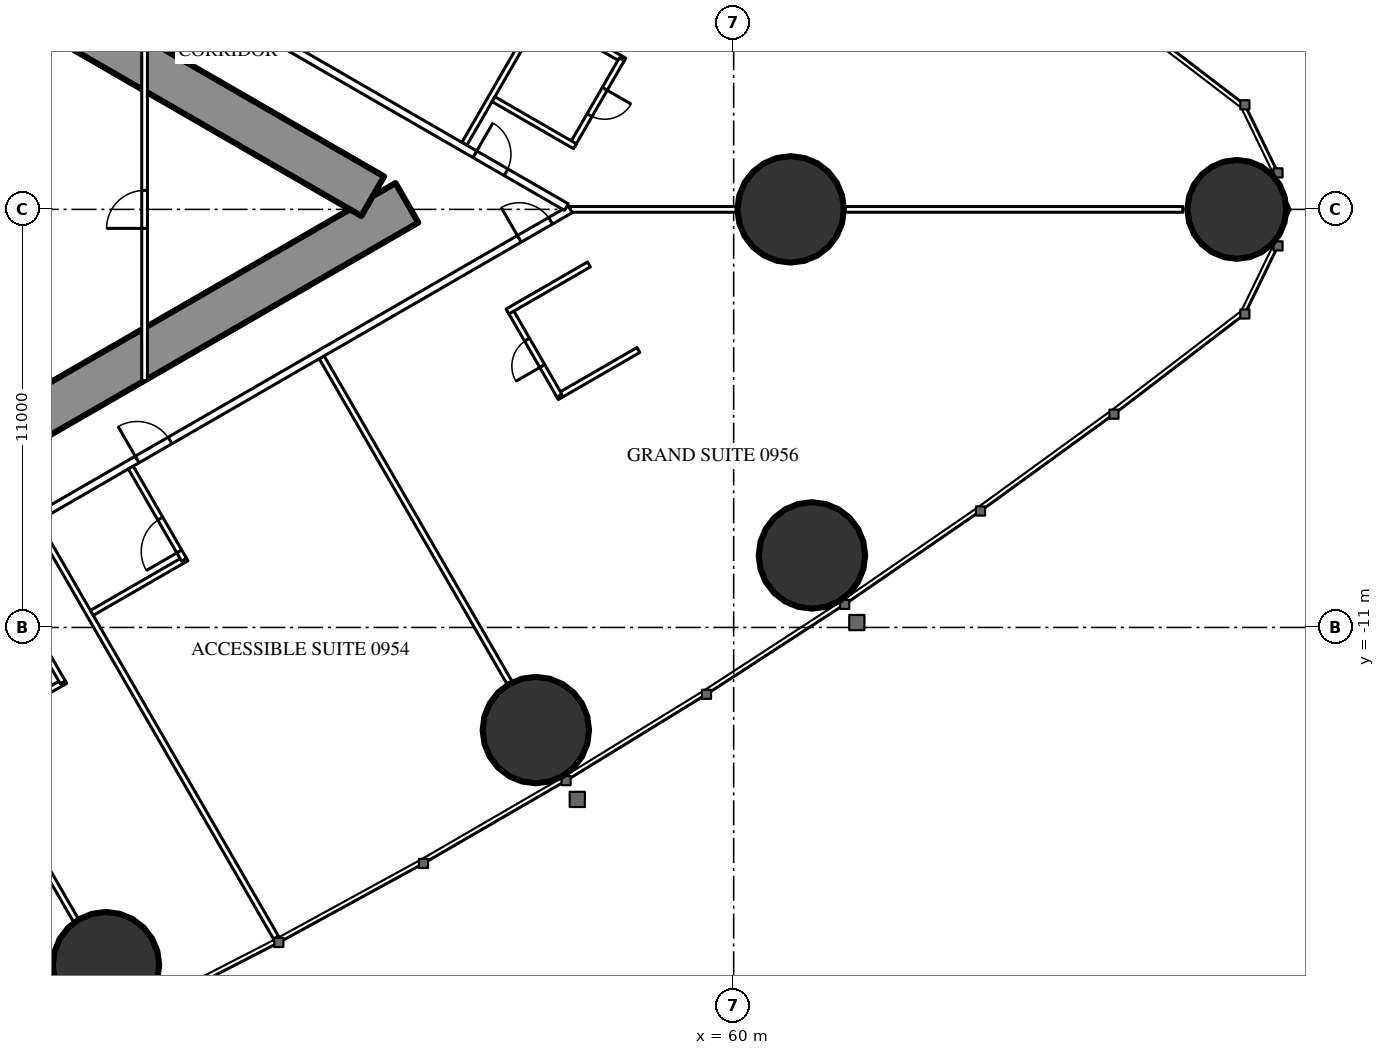
"""IFC4 building model, lengths in metres.
Left out: names, types, materials, properties, quantities, classifications, styles, units other than length and angle.
Written with IfcOpenShell. Run it as: python <this file> out.ifc"""

import sys

from ifc_helpers import new_model, si_unit, direction, frame, frame_2d, origin, origin_2d, place, context, subcontext, project, spatial, rectangle, hollow_circle, extrude, element, fill, save


model = new_model("IFC4")
c1 = context("Model", 3, precision=1e-05, world=origin(), true_north=direction((0.0, 1.0)))
c2 = subcontext(c1, "Body", "Model", "MODEL_VIEW")
j1 = project(units=[si_unit("LENGTHUNIT", "METRE"), si_unit("PLANEANGLEUNIT", "RADIAN")], contexts=[c1])
p1 = place(None, origin())
s1 = spatial("IfcSite", under=j1, at=p1, CompositionType="ELEMENT")
p2 = place(p1, origin())
s2 = spatial("IfcBuilding", under=s1, at=p2, CompositionType="ELEMENT")
p3 = place(p2, frame((0.0, 0.0, 39.0)))
s3 = spatial("IfcBuildingStorey", under=s2, at=p3, CompositionType="ELEMENT", Elevation=39.0)
p4 = place(p3, frame((73.239, 0.0, 0.0), z_axis=(0.0, 0.0, 1.0), x_axis=(1.0, 0.0, 0.0)))
e1 = element("IfcColumn", 1, at=p4, inside=s3, PredefinedType="COLUMN", context=c2, shape_type="SweptSolid", body=[
    extrude(hollow_circle(Radius=1.3, WallThickness=0.1, at=origin_2d()), origin(), (0.0, 0.0, 1.0), 3.5),
])
for number, where, z_axis, x_axis in (
    (2, (43.484, -19.886, 0.0), (0.0, 0.0, 1.0), (1.0, 0.0, 0.0)),
    (3, (54.795, -13.701, 0.0), (0.0, 0.0, 1.0), (1.0, 0.0, 0.0)),
    (4, (62.059, -9.105, 0.0), (0.0, 0.0, 1.0), (1.0, 0.0, 0.0)),
):
    element("IfcColumn", number, at=place(p3, frame(where, z_axis=z_axis, x_axis=x_axis)), inside=s3, PredefinedType="COLUMN", context=c2, shape_type="SweptSolid", body=[
        extrude(hollow_circle(Radius=1.4, WallThickness=0.12, at=origin_2d()), origin(), (0.0, 0.0, 1.0), 3.5),
    ])
p5 = place(p3, frame((61.5, 0.0, 0.0), z_axis=(0.0, 0.0, 1.0), x_axis=(1.0, 0.0, 0.0)))
e5 = element("IfcColumn", 5, at=p5, inside=s3, PredefinedType="COLUMN", context=c2, shape_type="SweptSolid", body=[
    extrude(hollow_circle(Radius=1.4, WallThickness=0.1, at=origin_2d()), origin(), (0.0, 0.0, 1.0), 3.5),
])
p6 = place(p3, frame((27.2, -13.8, 0.0), z_axis=(0.0, 0.0, 1.0), x_axis=(0.866027159892, 0.499996958321, 0.0)))
e6 = element("IfcWall", 6, at=p6, inside=s3, PredefinedType="SHEAR", context=c2, shape_type="SweptSolid", body=[
    extrude(rectangle(XDim=27.947, YDim=1.2, at=frame_2d((13.973, 0.0))), origin(), (0.0, 0.0, 1.0), 3.5),
])
p7 = place(p6, frame((4.6, 0.0, 0.0)))
e7 = element("IfcOpeningElement", 7, at=p7, cuts=e6, PredefinedType="OPENING", context=c2, shape_type="SweptSolid", body=[
    extrude(rectangle(XDim=1.0, YDim=2.2, at=frame_2d((0.5, 1.1))), frame((0.0, 0.61, 0.0), z_axis=(0.0, -1.0, 0.0), x_axis=(1.0, 0.0, 0.0)), (0.0, 0.0, 1.0), 1.22),
])
p8 = place(p6, frame((13.395, 0.0, 0.0)))
e8 = element("IfcOpeningElement", 8, at=p8, cuts=e6, PredefinedType="OPENING", context=c2, shape_type="SweptSolid", body=[
    extrude(rectangle(XDim=1.8, YDim=2.2, at=frame_2d((0.9, 1.1))), frame((0.0, 0.61, 0.0), z_axis=(0.0, -1.0, 0.0), x_axis=(1.0, 0.0, 0.0)), (0.0, 0.0, 1.0), 1.22),
])
p9 = place(p3, frame((27.2, 13.8, 0.0), z_axis=(0.0, 0.0, 1.0), x_axis=(0.866024515034, -0.500001539357, 0.0)))
e9 = element("IfcWall", 9, at=p9, inside=s3, PredefinedType="SHEAR", context=c2, shape_type="SweptSolid", body=[
    extrude(rectangle(XDim=26.907, YDim=1.2, at=frame_2d((13.454, 0.0))), origin(), (0.0, 0.0, 1.0), 3.5),
])
p10 = place(p9, frame((4.6, 0.0, 0.0)))
e10 = element("IfcOpeningElement", 10, at=p10, cuts=e9, PredefinedType="OPENING", context=c2, shape_type="SweptSolid", body=[
    extrude(rectangle(XDim=1.0, YDim=2.2, at=frame_2d((0.5, 1.1))), frame((0.0, 0.61, 0.0), z_axis=(0.0, -1.0, 0.0), x_axis=(1.0, 0.0, 0.0)), (0.0, 0.0, 1.0), 1.22),
])
p11 = place(p9, frame((13.395, 0.0, 0.0)))
e11 = element("IfcOpeningElement", 11, at=p11, cuts=e9, PredefinedType="OPENING", context=c2, shape_type="SweptSolid", body=[
    extrude(rectangle(XDim=1.8, YDim=2.2, at=frame_2d((0.9, 1.1))), frame((0.0, 0.61, 0.0), z_axis=(0.0, -1.0, 0.0), x_axis=(1.0, 0.0, 0.0)), (0.0, 0.0, 1.0), 1.22),
])
p12 = place(p3, frame((41.647, -8.23, 0.0), z_axis=(0.0, 0.0, 1.0), x_axis=(0.49998590462, -0.866033541603, 0.0)))
e12 = element("IfcWall", 12, at=p12, inside=s3, PredefinedType="PARTITIONING", context=c2, shape_type="SweptSolid", body=[
    extrude(rectangle(XDim=12.621, YDim=0.15, at=frame_2d((6.311, 0.0))), origin(), (0.0, 0.0, 1.0), 3.25),
])
p13 = place(p3, frame((49.159, -3.893, 0.0), z_axis=(0.0, 0.0, 1.0), x_axis=(0.499998773722, -0.866026111775, 0.0)))
e13 = element("IfcWall", 13, at=p13, inside=s3, PredefinedType="PARTITIONING", context=c2, shape_type="SweptSolid", body=[
    extrude(rectangle(XDim=9.892, YDim=0.15, at=frame_2d((4.946, 0.0))), origin(), (0.0, 0.0, 1.0), 2.25),
])
p14 = place(p3, frame((52.915, 1.725, 0.0), z_axis=(0.0, 0.0, 1.0), x_axis=(0.499997163113, 0.866027041656, 0.0)))
e14 = element("IfcWall", 14, at=p14, inside=s3, PredefinedType="PARTITIONING", context=c2, shape_type="SweptSolid", body=[
    extrude(rectangle(XDim=12.591, YDim=0.15, at=frame_2d((6.295, 0.0))), origin(), (0.0, 0.0, 1.0), 3.25),
])
p15 = place(p3, frame((55.702, 0.0, 0.0), z_axis=(0.0, 0.0, 1.0), x_axis=(1.0, 0.0, 0.0)))
e15 = element("IfcWall", 15, at=p15, inside=s3, PredefinedType="PARTITIONING", context=c2, shape_type="SweptSolid", body=[
    extrude(rectangle(XDim=16.117, YDim=0.15, at=frame_2d((8.059, 0.0))), origin(), (0.0, 0.0, 1.0), 2.25),
])
p16 = place(p3, frame((40.57, -15.03, 0.0), z_axis=(0.0, 0.0, 1.0), x_axis=(0.500012993597, -0.866017901798, 0.0)))
e16 = element("IfcWall", 16, at=p16, inside=s3, PredefinedType="PARTITIONING", context=c2, shape_type="SweptSolid", body=[
    extrude(rectangle(XDim=4.243, YDim=0.15, at=frame_2d((2.122, 0.0))), origin(), (0.0, 0.0, 1.0), 3.25),
])
p17 = place(p3, frame((37.96, -10.243, 0.0), z_axis=(0.0, 0.0, 1.0), x_axis=(0.866026429433, 0.499998223521, 0.0)))
e17 = element("IfcWall", 17, at=p17, inside=s3, PredefinedType="PARTITIONING", context=c2, shape_type="SweptSolid", body=[
    extrude(rectangle(XDim=20.487, YDim=0.2, at=frame_2d((10.243, 0.0))), origin(), (0.0, 0.0, 1.0), 3.25),
])
p18 = place(p17, frame((7.325, 0.0, 0.0)))
e18 = element("IfcOpeningElement", 18, at=p18, cuts=e17, PredefinedType="OPENING", context=c2, shape_type="SweptSolid", body=[
    extrude(rectangle(XDim=1.0, YDim=2.2, at=frame_2d((0.5, 1.1))), frame((0.0, 0.11, 0.0), z_axis=(0.0, -1.0, 0.0), x_axis=(1.0, 0.0, 0.0)), (0.0, 0.0, 1.0), 0.22),
])
p19 = place(p17, frame((18.937, 0.0, 0.0)))
e19 = element("IfcOpeningElement", 19, at=p19, cuts=e17, PredefinedType="OPENING", context=c2, shape_type="SweptSolid", body=[
    extrude(rectangle(XDim=0.95, YDim=2.2, at=frame_2d((0.475, 1.1))), frame((0.0, 0.11, 0.0), z_axis=(0.0, -1.0, 0.0), x_axis=(1.0, 0.0, 0.0)), (0.0, 0.0, 1.0), 0.22),
])
p20 = place(p17, frame((0.6, 0.0, 0.0)))
e20 = element("IfcOpeningElement", 20, at=p20, cuts=e17, PredefinedType="OPENING", context=c2, shape_type="SweptSolid", body=[
    extrude(rectangle(XDim=0.95, YDim=2.2, at=frame_2d((0.475, 1.1))), frame((0.0, 0.11, 0.0), z_axis=(0.0, -1.0, 0.0), x_axis=(1.0, 0.0, 0.0)), (0.0, 0.0, 1.0), 0.22),
])
p21 = place(p3, frame((36.834, 10.894, 0.0), z_axis=(0.0, 0.0, 1.0), x_axis=(0.866028157229, -0.499995230863, 0.0)))
e21 = element("IfcWall", 21, at=p21, inside=s3, PredefinedType="PARTITIONING", context=c2, shape_type="SweptSolid", body=[
    extrude(rectangle(XDim=21.667, YDim=0.2, at=frame_2d((10.833, 0.0))), origin(), (0.0, 0.0, 1.0), 3.25),
])
p22 = place(p21, frame((18.885, 0.0, 0.0)))
e22 = element("IfcOpeningElement", 22, at=p22, cuts=e21, PredefinedType="OPENING", context=c2, shape_type="SweptSolid", body=[
    extrude(rectangle(XDim=0.95, YDim=2.2, at=frame_2d((0.475, 1.1))), frame((0.0, 0.11, 0.0), z_axis=(0.0, -1.0, 0.0), x_axis=(1.0, 0.0, 0.0)), (0.0, 0.0, 1.0), 0.22),
])
p23 = place(p21, frame((10.212, 0.0, 0.0)))
e23 = element("IfcOpeningElement", 23, at=p23, cuts=e21, PredefinedType="OPENING", context=c2, shape_type="SweptSolid", body=[
    extrude(rectangle(XDim=0.95, YDim=2.2, at=frame_2d((0.475, 1.1))), frame((0.0, 0.11, 0.0), z_axis=(0.0, -1.0, 0.0), x_axis=(1.0, 0.0, 0.0)), (0.0, 0.0, 1.0), 0.22),
])
p24 = place(p21, frame((8.225, 0.0, 0.0)))
e24 = element("IfcOpeningElement", 24, at=p24, cuts=e21, PredefinedType="OPENING", context=c2, shape_type="SweptSolid", body=[
    extrude(rectangle(XDim=0.95, YDim=2.2, at=frame_2d((0.475, 1.1))), frame((0.0, 0.11, 0.0), z_axis=(0.0, -1.0, 0.0), x_axis=(1.0, 0.0, 0.0)), (0.0, 0.0, 1.0), 0.22),
])
p25 = place(p21, frame((1.825, 0.0, 0.0)))
e25 = element("IfcOpeningElement", 25, at=p25, cuts=e21, PredefinedType="OPENING", context=c2, shape_type="SweptSolid", body=[
    extrude(rectangle(XDim=0.95, YDim=2.2, at=frame_2d((0.475, 1.1))), frame((0.0, 0.11, 0.0), z_axis=(0.0, -1.0, 0.0), x_axis=(1.0, 0.0, 0.0)), (0.0, 0.0, 1.0), 0.22),
])
p26 = place(p21, frame((0.246, 0.0, 0.0)))
e26 = element("IfcOpeningElement", 26, at=p26, cuts=e21, PredefinedType="OPENING", context=c2, shape_type="SweptSolid", body=[
    extrude(rectangle(XDim=0.9, YDim=2.2, at=frame_2d((0.45, 1.1))), frame((0.0, 0.11, 0.0), z_axis=(0.0, -1.0, 0.0), x_axis=(1.0, 0.0, 0.0)), (0.0, 0.0, 1.0), 0.22),
])
p27 = place(p3, frame((43.112, -10.617, 0.0), z_axis=(0.0, 0.0, 1.0), x_axis=(0.866018712932, 0.500011588718, 0.0)))
e27 = element("IfcWall", 27, at=p27, inside=s3, PredefinedType="PARTITIONING", context=c2, shape_type="SweptSolid", body=[
    extrude(rectangle(XDim=2.875, YDim=0.15, at=frame_2d((1.438, 0.0))), origin(), (0.0, 0.0, 1.0), 3.25),
])
p28 = place(p3, frame((44.137, -6.792, 0.0), z_axis=(0.0, 0.0, 1.0), x_axis=(0.49994636267, -0.866056369097, 0.0)))
e28 = element("IfcWall", 28, at=p28, inside=s3, PredefinedType="PARTITIONING", context=c2, shape_type="SweptSolid", body=[
    extrude(rectangle(XDim=2.8, YDim=0.15, at=frame_2d((1.4, 0.0))), origin(), (0.0, 0.0, 1.0), 3.25),
])
p29 = place(p28, frame((1.55, 0.0, 0.0)))
e29 = element("IfcOpeningElement", 29, at=p29, cuts=e28, PredefinedType="OPENING", context=c2, shape_type="SweptSolid", body=[
    extrude(rectangle(XDim=1.0, YDim=2.2, at=frame_2d((0.5, 1.1))), frame((0.0, 0.085, 0.0), z_axis=(0.0, -1.0, 0.0), x_axis=(1.0, 0.0, 0.0)), (0.0, 0.0, 1.0), 0.17),
])
p30 = place(p3, frame((55.349, -4.938, 0.0), z_axis=(0.0, 0.0, 1.0), x_axis=(0.866006523861, 0.500032699561, 0.0)))
e30 = element("IfcWall", 30, at=p30, inside=s3, PredefinedType="PARTITIONING", context=c2, shape_type="SweptSolid", body=[
    extrude(rectangle(XDim=2.475, YDim=0.15, at=frame_2d((1.237, 0.0))), origin(), (0.0, 0.0, 1.0), 3.25),
])
p31 = place(p3, frame((54.114, -2.649, 0.0), z_axis=(0.0, 0.0, 1.0), x_axis=(0.500006934395, -0.866021400173, 0.0)))
e31 = element("IfcWall", 31, at=p31, inside=s3, PredefinedType="PARTITIONING", context=c2, shape_type="SweptSolid", body=[
    extrude(rectangle(XDim=2.6, YDim=0.15, at=frame_2d((1.3, 0.0))), origin(), (0.0, 0.0, 1.0), 3.25),
])
p32 = place(p31, frame((0.9, 0.0, 0.0)))
e32 = element("IfcOpeningElement", 32, at=p32, cuts=e31, PredefinedType="OPENING", context=c2, shape_type="SweptSolid", body=[
    extrude(rectangle(XDim=0.8, YDim=2.2, at=frame_2d((0.4, 1.1))), frame((0.0, 0.085, 0.0), z_axis=(0.0, -1.0, 0.0), x_axis=(1.0, 0.0, 0.0)), (0.0, 0.0, 1.0), 0.17),
])
for number, where, z_axis, x_axis in (
    (33, (54.049, -2.687, 0.0), (0.0, 0.0, 1.0), (0.866, 0.5, 0.0)),
    (34, (54.98, 5.151, 0.0), (0.0, 0.0, 1.0), (0.866, -0.5, 0.0)),
):
    element("IfcWall", number, at=place(p3, frame(where, z_axis=z_axis, x_axis=x_axis)), inside=s3, PredefinedType="PARTITIONING", context=c2, shape_type="SweptSolid", body=[
        extrude(rectangle(XDim=2.475, YDim=0.15, at=frame_2d((1.237, 0.0))), origin(), (0.0, 0.0, 1.0), 3.25),
    ])
p33 = place(p3, frame((55.758, 1.7, 0.0), z_axis=(0.0, 0.0, 1.0), x_axis=(0.500006934395, 0.866021400173, 0.0)))
e35 = element("IfcWall", 35, at=p33, inside=s3, PredefinedType="PARTITIONING", context=c2, shape_type="SweptSolid", body=[
    extrude(rectangle(XDim=2.6, YDim=0.15, at=frame_2d((1.3, 0.0))), origin(), (0.0, 0.0, 1.0), 3.25),
])
p34 = place(p33, frame((0.9, 0.0, 0.0)))
e36 = element("IfcOpeningElement", 36, at=p34, cuts=e35, PredefinedType="OPENING", context=c2, shape_type="SweptSolid", body=[
    extrude(rectangle(XDim=0.8, YDim=2.2, at=frame_2d((0.4, 1.1))), frame((0.0, 0.085, 0.0), z_axis=(0.0, -1.0, 0.0), x_axis=(1.0, 0.0, 0.0)), (0.0, 0.0, 1.0), 0.17),
])
p35 = place(p3, frame((53.68, 2.9, 0.0), z_axis=(0.0, 0.0, 1.0), x_axis=(0.866006523861, -0.500032699561, 0.0)))
e37 = element("IfcWall", 37, at=p35, inside=s3, PredefinedType="PARTITIONING", context=c2, shape_type="SweptSolid", body=[
    extrude(rectangle(XDim=2.475, YDim=0.15, at=frame_2d((1.237, 0.0))), origin(), (0.0, 0.0, 1.0), 3.25),
])
p36 = place(p3, frame((40.27, -13.644, 0.0), z_axis=(0.0, 0.0, 1.0), x_axis=(0.866031185235, 0.4999899861, 0.0)))
e38 = element("IfcWall", 38, at=p36, inside=s3, PredefinedType="PARTITIONING", context=c2, shape_type="SweptSolid", body=[
    extrude(rectangle(XDim=2.475, YDim=0.15, at=frame_2d((1.238, 0.0))), origin(), (0.0, 0.0, 1.0), 3.25),
])
p37 = place(p3, frame((41.048, -10.193, 0.0), z_axis=(0.0, 0.0, 1.0), x_axis=(0.500047596559, -0.865997922154, 0.0)))
e39 = element("IfcWall", 39, at=p37, inside=s3, PredefinedType="PARTITIONING", context=c2, shape_type="SweptSolid", body=[
    extrude(rectangle(XDim=2.6, YDim=0.15, at=frame_2d((1.3, 0.0))), origin(), (0.0, 0.0, 1.0), 3.25),
])
p38 = place(p37, frame((0.9, 0.0, 0.0)))
e40 = element("IfcOpeningElement", 40, at=p38, cuts=e39, PredefinedType="OPENING", context=c2, shape_type="SweptSolid", body=[
    extrude(rectangle(XDim=0.8, YDim=2.2, at=frame_2d((0.4, 1.1))), frame((0.0, 0.085, 0.0), z_axis=(0.0, -1.0, 0.0), x_axis=(1.0, 0.0, 0.0)), (0.0, 0.0, 1.0), 0.17),
])
p39 = place(p3, frame((44.5, -4.505, 0.0), z_axis=(0.0, 0.0, 1.0), x_axis=(0.0, 1.0, 0.0)))
e41 = element("IfcWall", 41, at=p39, inside=s3, PredefinedType="PARTITIONING", context=c2, shape_type="SweptSolid", body=[
    extrude(rectangle(XDim=9.009, YDim=0.15, at=frame_2d((4.505, 0.0))), origin(), (0.0, 0.0, 1.0), 2.45),
])
p40 = place(p39, frame((4.005, 0.0, 0.0)))
e42 = element("IfcOpeningElement", 42, at=p40, cuts=e41, PredefinedType="OPENING", context=c2, shape_type="SweptSolid", body=[
    extrude(rectangle(XDim=1.0, YDim=2.2, at=frame_2d((0.5, 1.1))), frame((0.0, 0.085, 0.0), z_axis=(0.0, -1.0, 0.0), x_axis=(1.0, 0.0, 0.0)), (0.0, 0.0, 1.0), 0.17),
])
p41 = place(p29, origin())
e43 = element("IfcDoor", 43, at=p41, inside=s3, OperationType="SINGLE_SWING_RIGHT", PredefinedType="DOOR", context=c2, shape_type="SweptSolid", body=[
    extrude(rectangle(XDim=1.0, YDim=2.2, at=frame_2d((0.5, 1.1))), frame((0.0, 0.025, 0.0), z_axis=(0.0, -1.0, 0.0), x_axis=(1.0, 0.0, 0.0)), (0.0, 0.0, 1.0), 0.05),
])
fill(e29, e43)
p42 = place(p18, origin())
e44 = element("IfcDoor", 44, at=p42, inside=s3, OperationType="SINGLE_SWING_LEFT", PredefinedType="DOOR", context=c2, shape_type="SweptSolid", body=[
    extrude(rectangle(XDim=1.0, YDim=2.2, at=frame_2d((0.5, 1.1))), frame((0.0, 0.025, 0.0), z_axis=(0.0, -1.0, 0.0), x_axis=(1.0, 0.0, 0.0)), (0.0, 0.0, 1.0), 0.05),
])
fill(e18, e44)
p43 = place(p32, origin())
e45 = element("IfcDoor", 45, at=p43, inside=s3, OperationType="SINGLE_SWING_RIGHT", PredefinedType="DOOR", context=c2, shape_type="SweptSolid", body=[
    extrude(rectangle(XDim=0.8, YDim=2.2, at=frame_2d((0.4, 1.1))), frame((0.0, 0.025, 0.0), z_axis=(0.0, -1.0, 0.0), x_axis=(1.0, 0.0, 0.0)), (0.0, 0.0, 1.0), 0.05),
])
fill(e32, e45)
p44 = place(p19, origin())
e46 = element("IfcDoor", 46, at=p44, inside=s3, OperationType="SINGLE_SWING_LEFT", PredefinedType="DOOR", context=c2, shape_type="SweptSolid", body=[
    extrude(rectangle(XDim=0.95, YDim=2.2, at=frame_2d((0.475, 1.1))), frame((0.0, 0.025, 0.0), z_axis=(0.0, -1.0, 0.0), x_axis=(1.0, 0.0, 0.0)), (0.0, 0.0, 1.0), 0.05),
])
fill(e19, e46)
p45 = place(p34, origin())
e47 = element("IfcDoor", 47, at=p45, inside=s3, OperationType="SINGLE_SWING_RIGHT", PredefinedType="DOOR", context=c2, shape_type="SweptSolid", body=[
    extrude(rectangle(XDim=0.8, YDim=2.2, at=frame_2d((0.4, 1.1))), frame((0.0, 0.025, 0.0), z_axis=(0.0, -1.0, 0.0), x_axis=(1.0, 0.0, 0.0)), (0.0, 0.0, 1.0), 0.05),
])
fill(e36, e47)
p46 = place(p22, origin())
e48 = element("IfcDoor", 48, at=p46, inside=s3, OperationType="SINGLE_SWING_LEFT", PredefinedType="DOOR", context=c2, shape_type="SweptSolid", body=[
    extrude(rectangle(XDim=0.95, YDim=2.2, at=frame_2d((0.475, 1.1))), frame((0.0, 0.025, 0.0), z_axis=(0.0, -1.0, 0.0), x_axis=(1.0, 0.0, 0.0)), (0.0, 0.0, 1.0), 0.05),
])
fill(e22, e48)
p47 = place(p40, origin())
e49 = element("IfcDoor", 49, at=p47, inside=s3, OperationType="SINGLE_SWING_LEFT", PredefinedType="DOOR", context=c2, shape_type="SweptSolid", body=[
    extrude(rectangle(XDim=1.0, YDim=2.2, at=frame_2d((0.5, 1.1))), frame((0.0, 0.025, 0.0), z_axis=(0.0, -1.0, 0.0), x_axis=(1.0, 0.0, 0.0)), (0.0, 0.0, 1.0), 0.05),
])
fill(e42, e49)
save(model, sys.argv[1])
